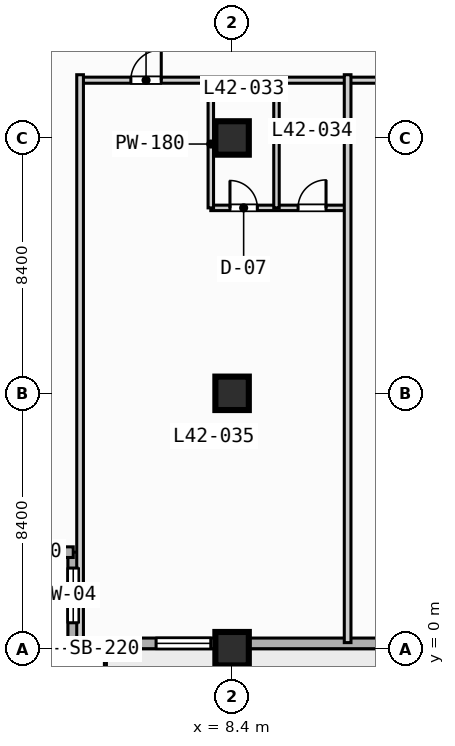
"""IFC4 building model, lengths in metres.
Left out: names, types, materials, properties, quantities, classifications, styles, units other than length and angle.
Written with IfcOpenShell. Run it as: python <this file> out.ifc"""

import sys

from ifc_helpers import new_model, si_unit, direction, frame, frame_2d, origin, origin_2d, place, context, subcontext, project, spatial, rectangle, extrude, element, fill, save


model = new_model("IFC4")
c1 = context("Model", 3, precision=1e-05, world=origin(), true_north=direction((0.0, 1.0)))
c2 = subcontext(c1, "Body", "Model", "MODEL_VIEW")
j1 = project(units=[si_unit("LENGTHUNIT", "METRE"), si_unit("PLANEANGLEUNIT", "RADIAN")], contexts=[c1])
p1 = place(None, origin())
s1 = spatial("IfcSite", under=j1, at=p1, CompositionType="ELEMENT")
p2 = place(p1, origin())
s2 = spatial("IfcBuilding", under=s1, at=p2, CompositionType="ELEMENT")
p3 = place(p2, frame((0.0, 0.0, 175.4)))
s3 = spatial("IfcBuildingStorey", under=s2, at=p3, CompositionType="ELEMENT", Elevation=175.4)
for number, where, z_axis, x_axis in (
    (1, (8.4, 0.0, 0.0), (0.0, 0.0, 1.0), (1.0, 0.0, 0.0)),
    (2, (8.4, 8.4, 0.0), (0.0, 0.0, 1.0), (1.0, 0.0, 0.0)),
    (3, (8.4, 16.8, 0.0), (0.0, 0.0, 1.0), (1.0, 0.0, 0.0)),
):
    element("IfcColumn", number, at=place(p3, frame(where, z_axis=z_axis, x_axis=x_axis)), inside=s3, PredefinedType="COLUMN", context=c2, shape_type="SweptSolid", body=[
        extrude(rectangle(XDim=1.1, YDim=1.1, at=origin_2d()), origin(), (0.0, 0.0, 1.0), 3.7),
    ])
p4 = place(p3, frame((3.175, 0.175, 0.0), z_axis=(0.0, 0.0, 1.0), x_axis=(0.0, 1.0, 0.0)))
e4 = element("IfcWall", 4, at=p4, inside=s3, PredefinedType="STANDARD", context=c2, shape_type="SweptSolid", body=[
    extrude(rectangle(XDim=3.0, YDim=0.35, at=frame_2d((1.5, 0.0))), origin(), (0.0, 0.0, 1.0), 3.47),
])
p5 = place(p4, frame((0.677, 0.0, 0.85)))
e5 = element("IfcOpeningElement", 5, at=p5, cuts=e4, PredefinedType="OPENING", context=c2, shape_type="SweptSolid", body=[
    extrude(rectangle(XDim=1.8, YDim=1.8, at=frame_2d((0.9, 0.9))), frame((0.0, 0.185, 0.0), z_axis=(0.0, -1.0, 0.0), x_axis=(1.0, 0.0, 0.0)), (0.0, 0.0, 1.0), 0.37),
])
p6 = place(p3, frame((3.175, 3.175, 0.0), z_axis=(0.0, 0.0, 1.0), x_axis=(-1.0, 0.0, 0.0)))
e6 = element("IfcWall", 6, at=p6, inside=s3, PredefinedType="STANDARD", context=c2, shape_type="SweptSolid", body=[
    extrude(rectangle(XDim=3.0, YDim=0.35, at=frame_2d((1.5, 0.0))), origin(), (0.0, 0.0, 1.0), 3.47),
])
p7 = place(p3, frame((72.425, 0.175, 0.0), z_axis=(0.0, 0.0, 1.0), x_axis=(-1.0, 0.0, 0.0)))
e7 = element("IfcWall", 7, at=p7, inside=s3, PredefinedType="STANDARD", context=c2, shape_type="SweptSolid", body=[
    extrude(rectangle(XDim=69.25, YDim=0.35, at=frame_2d((34.625, 0.0))), origin(), (0.0, 0.0, 1.0), 3.47),
])
p8 = place(p7, frame((51.725, 0.0, 0.0)))
e8 = element("IfcOpeningElement", 8, at=p8, cuts=e7, PredefinedType="OPENING", context=c2, shape_type="SweptSolid", body=[
    extrude(rectangle(XDim=1.4, YDim=2.2, at=frame_2d((0.7, 1.1))), frame((0.0, 0.185, 0.0), z_axis=(0.0, -1.0, 0.0), x_axis=(1.0, 0.0, 0.0)), (0.0, 0.0, 1.0), 0.37),
])
p9 = place(p7, frame((33.725, 0.0, 0.85)))
e9 = element("IfcOpeningElement", 9, at=p9, cuts=e7, PredefinedType="OPENING", context=c2, shape_type="SweptSolid", body=[
    extrude(rectangle(XDim=1.8, YDim=1.8, at=frame_2d((0.9, 0.9))), frame((0.0, 0.185, 0.0), z_axis=(0.0, -1.0, 0.0), x_axis=(1.0, 0.0, 0.0)), (0.0, 0.0, 1.0), 0.37),
])
p10 = place(p7, frame((25.025, 0.0, 0.85)))
e10 = element("IfcOpeningElement", 10, at=p10, cuts=e7, PredefinedType="OPENING", context=c2, shape_type="SweptSolid", body=[
    extrude(rectangle(XDim=2.4, YDim=1.95, at=frame_2d((1.2, 0.975))), frame((0.0, 0.185, 0.0), z_axis=(0.0, -1.0, 0.0), x_axis=(1.0, 0.0, 0.0)), (0.0, 0.0, 1.0), 0.37),
])
p11 = place(p7, frame((8.225, 0.0, 0.85)))
e11 = element("IfcOpeningElement", 11, at=p11, cuts=e7, PredefinedType="OPENING", context=c2, shape_type="SweptSolid", body=[
    extrude(rectangle(XDim=2.4, YDim=1.95, at=frame_2d((1.2, 0.975))), frame((0.0, 0.185, 0.0), z_axis=(0.0, -1.0, 0.0), x_axis=(1.0, 0.0, 0.0)), (0.0, 0.0, 1.0), 0.37),
])
p12 = place(p7, frame((64.725, 0.0, 0.85)))
e12 = element("IfcOpeningElement", 12, at=p12, cuts=e7, PredefinedType="OPENING", context=c2, shape_type="SweptSolid", body=[
    extrude(rectangle(XDim=1.8, YDim=1.8, at=frame_2d((0.9, 0.9))), frame((0.0, 0.185, 0.0), z_axis=(0.0, -1.0, 0.0), x_axis=(1.0, 0.0, 0.0)), (0.0, 0.0, 1.0), 0.37),
])
p13 = place(p7, frame((44.675, 0.0, 0.85)))
e13 = element("IfcOpeningElement", 13, at=p13, cuts=e7, PredefinedType="OPENING", context=c2, shape_type="SweptSolid", body=[
    extrude(rectangle(XDim=1.8, YDim=1.8, at=frame_2d((0.9, 0.9))), frame((0.0, 0.185, 0.0), z_axis=(0.0, -1.0, 0.0), x_axis=(1.0, 0.0, 0.0)), (0.0, 0.0, 1.0), 0.37),
])
p14 = place(p3, frame((3.4, 18.7, 0.0), z_axis=(0.0, 0.0, 1.0), x_axis=(1.0, 0.0, 0.0)))
e14 = element("IfcWall", 14, at=p14, inside=s3, PredefinedType="PARTITIONING", context=c2, shape_type="SweptSolid", body=[
    extrude(rectangle(XDim=35.8, YDim=0.2, at=frame_2d((17.9, 0.0))), origin(), (0.0, 0.0, 1.0), 3.47),
])
p15 = place(p14, frame((1.67, 0.0, 0.0)))
e15 = element("IfcOpeningElement", 15, at=p15, cuts=e14, PredefinedType="OPENING", context=c2, shape_type="SweptSolid", body=[
    extrude(rectangle(XDim=1.0, YDim=2.15, at=frame_2d((0.5, 1.075))), frame((0.0, 0.11, 0.0), z_axis=(0.0, -1.0, 0.0), x_axis=(1.0, 0.0, 0.0)), (0.0, 0.0, 1.0), 0.22),
])
p16 = place(p14, frame((10.57, 0.0, 0.0)))
e16 = element("IfcOpeningElement", 16, at=p16, cuts=e14, PredefinedType="OPENING", context=c2, shape_type="SweptSolid", body=[
    extrude(rectangle(XDim=1.0, YDim=2.15, at=frame_2d((0.5, 1.075))), frame((0.0, 0.11, 0.0), z_axis=(0.0, -1.0, 0.0), x_axis=(1.0, 0.0, 0.0)), (0.0, 0.0, 1.0), 0.22),
])
p17 = place(p14, frame((19.47, 0.0, 0.0)))
e17 = element("IfcOpeningElement", 17, at=p17, cuts=e14, PredefinedType="OPENING", context=c2, shape_type="SweptSolid", body=[
    extrude(rectangle(XDim=1.0, YDim=2.15, at=frame_2d((0.5, 1.075))), frame((0.0, 0.11, 0.0), z_axis=(0.0, -1.0, 0.0), x_axis=(1.0, 0.0, 0.0)), (0.0, 0.0, 1.0), 0.22),
])
p18 = place(p14, frame((28.22, 0.0, 0.0)))
e18 = element("IfcOpeningElement", 18, at=p18, cuts=e14, PredefinedType="OPENING", context=c2, shape_type="SweptSolid", body=[
    extrude(rectangle(XDim=1.0, YDim=2.15, at=frame_2d((0.5, 1.075))), frame((0.0, 0.11, 0.0), z_axis=(0.0, -1.0, 0.0), x_axis=(1.0, 0.0, 0.0)), (0.0, 0.0, 1.0), 0.22),
])
p19 = place(p3, frame((3.4, 0.2, 0.0), z_axis=(0.0, 0.0, 1.0), x_axis=(0.0, 1.0, 0.0)))
e19 = element("IfcWall", 19, at=p19, inside=s3, PredefinedType="PARTITIONING", context=c2, shape_type="SweptSolid", body=[
    extrude(rectangle(XDim=18.68, YDim=0.22, at=frame_2d((9.34, 0.0))), origin(), (0.0, 0.0, 1.0), 3.47),
])
p20 = place(p3, frame((7.7, 14.5, 0.0), z_axis=(0.0, 0.0, 1.0), x_axis=(1.0, 0.0, 0.0)))
e20 = element("IfcWall", 20, at=p20, inside=s3, PredefinedType="PLUMBINGWALL", context=c2, shape_type="SweptSolid", body=[
    extrude(rectangle(XDim=4.5, YDim=0.18, at=frame_2d((2.25, 0.0))), origin(), (0.0, 0.0, 1.0), 3.47),
])
p21 = place(p20, frame((0.63, 0.0, 0.0)))
e21 = element("IfcOpeningElement", 21, at=p21, cuts=e20, PredefinedType="OPENING", context=c2, shape_type="SweptSolid", body=[
    extrude(rectangle(XDim=0.9, YDim=2.1, at=frame_2d((0.45, 1.05))), frame((0.0, 0.1, 0.0), z_axis=(0.0, -1.0, 0.0), x_axis=(1.0, 0.0, 0.0)), (0.0, 0.0, 1.0), 0.2),
])
p22 = place(p20, frame((2.87, 0.0, 0.0)))
e22 = element("IfcOpeningElement", 22, at=p22, cuts=e20, PredefinedType="OPENING", context=c2, shape_type="SweptSolid", body=[
    extrude(rectangle(XDim=0.92, YDim=2.1, at=frame_2d((0.46, 1.05))), frame((0.0, 0.1, 0.0), z_axis=(0.0, -1.0, 0.0), x_axis=(1.0, 0.0, 0.0)), (0.0, 0.0, 1.0), 0.2),
])
for number, where, z_axis, x_axis in (
    (23, (7.7, 14.5, 0.0), (0.0, 0.0, 1.0), (0.0, 1.0, 0.0)),
    (24, (9.86, 14.5, 0.0), (0.0, 0.0, 1.0), (0.0, 1.0, 0.0)),
):
    element("IfcWall", number, at=place(p3, frame(where, z_axis=z_axis, x_axis=x_axis)), inside=s3, PredefinedType="PLUMBINGWALL", context=c2, shape_type="SweptSolid", body=[
        extrude(rectangle(XDim=4.2, YDim=0.18, at=frame_2d((2.1, 0.0))), origin(), (0.0, 0.0, 1.0), 3.47),
    ])
p23 = place(p3, frame((12.2, 0.2, 0.0), z_axis=(0.0, 0.0, 1.0), x_axis=(0.0, 1.0, 0.0)))
e25 = element("IfcWall", 25, at=p23, inside=s3, PredefinedType="PARTITIONING", context=c2, shape_type="SweptSolid", body=[
    extrude(rectangle(XDim=18.68, YDim=0.22, at=frame_2d((9.34, 0.0))), origin(), (0.0, 0.0, 1.0), 3.47),
])
p24 = place(p5, origin())
e26 = element("IfcWindow", 26, at=p24, inside=s3, PartitioningType="SINGLE_PANEL", PredefinedType="WINDOW", context=c2, shape_type="SweptSolid", body=[
    extrude(rectangle(XDim=1.8, YDim=1.8, at=frame_2d((0.9, 0.9))), frame((0.0, 0.03, 0.0), z_axis=(0.0, -1.0, 0.0), x_axis=(1.0, 0.0, 0.0)), (0.0, 0.0, 1.0), 0.06),
])
fill(e5, e26)
p25 = place(p12, origin())
e27 = element("IfcWindow", 27, at=p25, inside=s3, PartitioningType="SINGLE_PANEL", PredefinedType="WINDOW", context=c2, shape_type="SweptSolid", body=[
    extrude(rectangle(XDim=1.8, YDim=1.8, at=frame_2d((0.9, 0.9))), frame((0.0, 0.03, 0.0), z_axis=(0.0, -1.0, 0.0), x_axis=(1.0, 0.0, 0.0)), (0.0, 0.0, 1.0), 0.06),
])
fill(e12, e27)
p26 = place(p15, origin())
e28 = element("IfcDoor", 28, at=p26, inside=s3, OperationType="SINGLE_SWING_RIGHT", PredefinedType="DOOR", context=c2, shape_type="SweptSolid", body=[
    extrude(rectangle(XDim=1.0, YDim=2.15, at=frame_2d((0.5, 1.075))), frame((0.0, 0.025, 0.0), z_axis=(0.0, -1.0, 0.0), x_axis=(1.0, 0.0, 0.0)), (0.0, 0.0, 1.0), 0.05),
])
fill(e15, e28)
p27 = place(p21, origin())
e29 = element("IfcDoor", 29, at=p27, inside=s3, OperationType="SINGLE_SWING_LEFT", PredefinedType="DOOR", context=c2, shape_type="SweptSolid", body=[
    extrude(rectangle(XDim=0.9, YDim=2.1, at=frame_2d((0.45, 1.05))), frame((0.0, 0.025, 0.0), z_axis=(0.0, -1.0, 0.0), x_axis=(1.0, 0.0, 0.0)), (0.0, 0.0, 1.0), 0.05),
])
fill(e21, e29)
p28 = place(p22, origin())
e30 = element("IfcDoor", 30, at=p28, inside=s3, OperationType="SINGLE_SWING_RIGHT", PredefinedType="DOOR", context=c2, shape_type="SweptSolid", body=[
    extrude(rectangle(XDim=0.92, YDim=2.1, at=frame_2d((0.46, 1.05))), frame((0.0, 0.025, 0.0), z_axis=(0.0, -1.0, 0.0), x_axis=(1.0, 0.0, 0.0)), (0.0, 0.0, 1.0), 0.05),
])
fill(e22, e30)
save(model, sys.argv[1])
